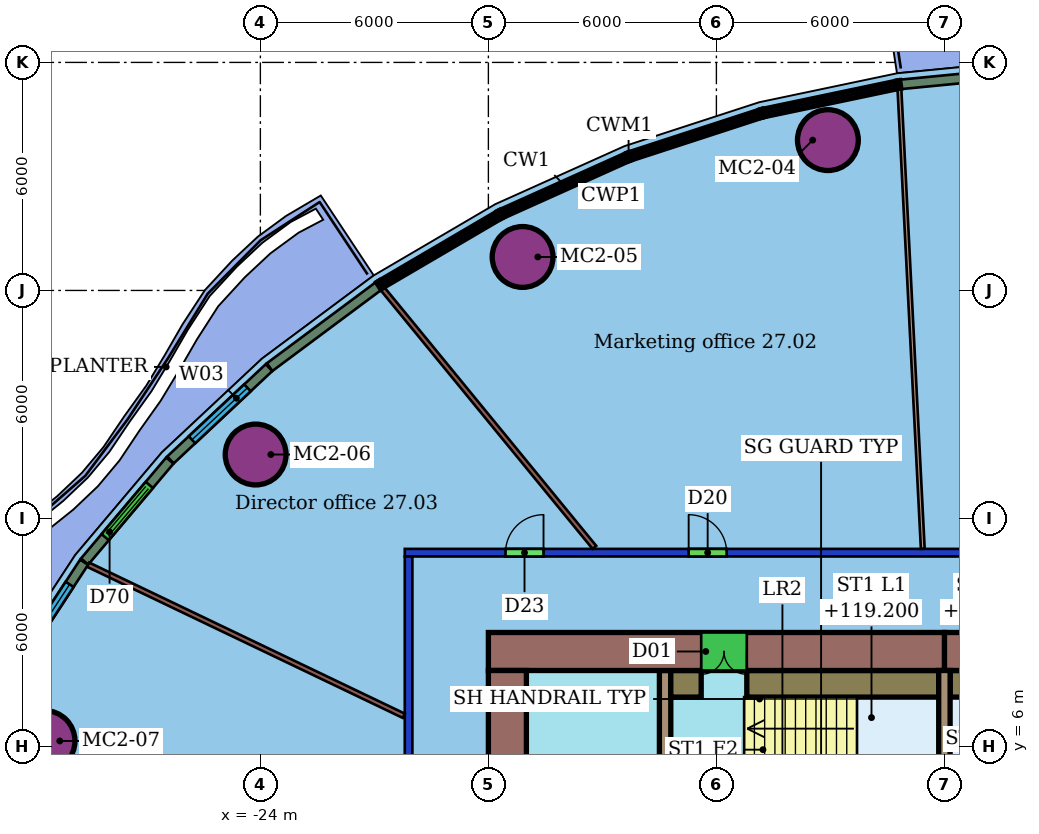
"""IFC4 building model, lengths in metres.
Left out: names, types, materials, properties, quantities, classifications, styles, units other than length and angle.
Written with IfcOpenShell. Run it as: python <this file> out.ifc"""

import sys

from ifc_helpers import new_model, si_unit, direction, frame, frame_2d, origin, origin_2d, place, context, subcontext, project, spatial, rectangle, hollow_circle, extrude, element, fill, save


model = new_model("IFC4")
c1 = context("Model", 3, precision=1e-05, world=origin(), true_north=direction((0.0, 1.0)))
c2 = subcontext(c1, "Body", "Model", "MODEL_VIEW")
j1 = project(units=[si_unit("LENGTHUNIT", "METRE"), si_unit("PLANEANGLEUNIT", "RADIAN")], contexts=[c1])
p1 = place(None, origin())
s1 = spatial("IfcSite", under=j1, at=p1, CompositionType="ELEMENT")
p2 = place(p1, origin())
s2 = spatial("IfcBuilding", under=s1, at=p2, CompositionType="ELEMENT")
p3 = place(p2, frame((0.0, 0.0, 117.4)))
s3 = spatial("IfcBuildingStorey", under=s2, at=p3, CompositionType="ELEMENT", Elevation=117.4)
for number, where, z_axis, x_axis in (
    (1, (-9.066, 21.956, 0.0), (0.0, 0.0, 1.0), (1.0, 0.0, 0.0)),
    (2, (-17.1, 18.881, 0.0), (0.0, 0.0, 1.0), (1.0, 0.0, 0.0)),
    (3, (-24.125, 13.683, 0.0), (0.0, 0.0, 1.0), (1.0, 0.0, 0.0)),
    (4, (-29.679, 6.146, 0.0), (0.0, 0.0, 1.0), (1.0, 0.0, 0.0)),
):
    element("IfcColumn", number, at=place(p3, frame(where, z_axis=z_axis, x_axis=x_axis)), inside=s3, PredefinedType="COLUMN", context=c2, shape_type="SweptSolid", body=[
        extrude(hollow_circle(Radius=0.8, WallThickness=0.055, at=origin_2d()), origin(), (0.0, 0.0, 1.0), 3.45),
    ])
p4 = place(p3, frame((-20.1, -11.0, 0.0), z_axis=(0.0, 0.0, 1.0), x_axis=(0.0, 1.0, 0.0)))
e5 = element("IfcWall", 5, at=p4, inside=s3, PredefinedType="PARTITIONING", context=c2, shape_type="SweptSolid", body=[
    extrude(rectangle(XDim=22.0, YDim=0.2, at=frame_2d((11.0, 0.0))), origin(), (0.0, 0.0, 1.0), 3.0),
])
p5 = place(p4, frame((8.824, 0.0, 0.0)))
e6 = element("IfcOpeningElement", 6, at=p5, cuts=e5, PredefinedType="OPENING", context=c2, shape_type="SweptSolid", body=[
    extrude(rectangle(XDim=1.8, YDim=2.1, at=frame_2d((0.9, 1.05))), frame((0.0, 0.11, 0.0), z_axis=(0.0, -1.0, 0.0), x_axis=(1.0, 0.0, 0.0)), (0.0, 0.0, 1.0), 0.22),
])
p6 = place(p3, frame((-20.2, 11.1, 0.0), z_axis=(0.0, 0.0, 1.0), x_axis=(1.0, 0.0, 0.0)))
e7 = element("IfcWall", 7, at=p6, inside=s3, PredefinedType="PARTITIONING", context=c2, shape_type="SweptSolid", body=[
    extrude(rectangle(XDim=28.4, YDim=0.2, at=frame_2d((14.2, 0.0))), origin(), (0.0, 0.0, 1.0), 3.0),
])
p7 = place(p6, frame((20.105, 0.0, 0.0)))
e8 = element("IfcOpeningElement", 8, at=p7, cuts=e7, PredefinedType="OPENING", context=c2, shape_type="SweptSolid", body=[
    extrude(rectangle(XDim=1.8, YDim=2.1, at=frame_2d((0.9, 1.05))), frame((0.0, 0.11, 0.0), z_axis=(0.0, -1.0, 0.0), x_axis=(1.0, 0.0, 0.0)), (0.0, 0.0, 1.0), 0.22),
])
p8 = place(p6, frame((7.47, 0.0, 0.0)))
e9 = element("IfcOpeningElement", 9, at=p8, cuts=e7, PredefinedType="OPENING", context=c2, shape_type="SweptSolid", body=[
    extrude(rectangle(XDim=1.0, YDim=2.1, at=frame_2d((0.5, 1.05))), frame((0.0, 0.11, 0.0), z_axis=(0.0, -1.0, 0.0), x_axis=(1.0, 0.0, 0.0)), (0.0, 0.0, 1.0), 0.22),
])
p9 = place(p6, frame((2.651, 0.0, 0.0)))
e10 = element("IfcOpeningElement", 10, at=p9, cuts=e7, PredefinedType="OPENING", context=c2, shape_type="SweptSolid", body=[
    extrude(rectangle(XDim=1.0, YDim=2.4, at=frame_2d((0.5, 1.2))), frame((0.0, 0.11, 0.0), z_axis=(0.0, -1.0, 0.0), x_axis=(1.0, 0.0, 0.0)), (0.0, 0.0, 1.0), 0.22),
])
p10 = place(p3, frame((-7.184, 23.293, 0.0), z_axis=(0.0, 0.0, 1.0), x_axis=(0.050758329283, -0.998710965199, 0.0)))
e11 = element("IfcWall", 11, at=p10, inside=s3, PredefinedType="PARTITIONING", context=c2, shape_type="SweptSolid", body=[
    extrude(rectangle(XDim=12.106, YDim=0.1, at=frame_2d((6.053, 0.0))), origin(), (0.0, 0.0, 1.0), 3.45),
])
p11 = place(p3, frame((-20.782, 18.041, 0.0), z_axis=(0.0, 0.0, 1.0), x_axis=(0.633801615076, -0.773495644931, 0.0)))
e12 = element("IfcWall", 12, at=p11, inside=s3, PredefinedType="PARTITIONING", context=c2, shape_type="SweptSolid", body=[
    extrude(rectangle(XDim=8.792, YDim=0.125, at=frame_2d((4.396, 0.0))), origin(), (0.0, 0.0, 1.0), 3.45),
])
p12 = place(p3, frame((-28.532, 10.784, 0.0), z_axis=(0.0, 0.0, 1.0), x_axis=(0.902015716064, -0.431703194306, 0.0)))
e13 = element("IfcWall", 13, at=p12, inside=s3, PredefinedType="PARTITIONING", context=c2, shape_type="SweptSolid", body=[
    extrude(rectangle(XDim=9.207, YDim=0.125, at=frame_2d((4.604, 0.0))), origin(), (0.0, 0.0, 1.0), 3.45),
])
for number, where, z_axis, x_axis in (
    (14, (-3.598, 23.769, 0.0), (0.0, 0.0, 1.0), (-0.995, -0.097, 0.0)),
    (15, (-20.896, 18.112, 0.0), (0.0, 0.0, 1.0), (-0.802, -0.597, 0.0)),
):
    element("IfcWall", number, at=place(p3, frame(where, z_axis=z_axis, x_axis=x_axis)), inside=s3, PredefinedType="SOLIDWALL", context=c2, shape_type="SweptSolid", body=[
        extrude(rectangle(XDim=3.567, YDim=0.25, at=frame_2d((1.783, 0.0))), origin(), (0.0, 0.0, 1.0), 3.05),
    ])
p13 = place(p3, frame((-23.774, 15.968, 0.0), z_axis=(0.0, 0.0, 1.0), x_axis=(-0.729895135737, -0.683559134843, 0.0)))
e16 = element("IfcWall", 16, at=p13, inside=s3, PredefinedType="SOLIDWALL", context=c2, shape_type="SweptSolid", body=[
    extrude(rectangle(XDim=3.551, YDim=0.25, at=frame_2d((1.776, 0.0))), origin(), (0.0, 0.0, 1.0), 3.05),
])
p14 = place(p13, frame((0.776, 0.0, 0.9)))
e17 = element("IfcOpeningElement", 17, at=p14, cuts=e16, PredefinedType="OPENING", context=c2, shape_type="SweptSolid", body=[
    extrude(rectangle(XDim=2.0, YDim=2.1, at=frame_2d((1.0, 1.05))), frame((0.0, 0.135, 0.0), z_axis=(0.0, -1.0, 0.0), x_axis=(1.0, 0.0, 0.0)), (0.0, 0.0, 1.0), 0.27),
])
p15 = place(p3, frame((-26.381, 13.524, 0.0), z_axis=(0.0, 0.0, 1.0), x_axis=(-0.645164421971, -0.764043760934, 0.0)))
e18 = element("IfcWall", 18, at=p15, inside=s3, PredefinedType="SOLIDWALL", context=c2, shape_type="SweptSolid", body=[
    extrude(rectangle(XDim=3.477, YDim=0.25, at=frame_2d((1.738, 0.0))), origin(), (0.0, 0.0, 1.0), 3.05),
])
p16 = place(p15, frame((0.839, 0.0, 0.0)))
e19 = element("IfcOpeningElement", 19, at=p16, cuts=e18, PredefinedType="OPENING", context=c2, shape_type="SweptSolid", body=[
    extrude(rectangle(XDim=1.8, YDim=2.4, at=frame_2d((0.9, 1.2))), frame((0.0, 0.135, 0.0), z_axis=(0.0, -1.0, 0.0), x_axis=(1.0, 0.0, 0.0)), (0.0, 0.0, 1.0), 0.27),
])
p17 = place(p3, frame((-28.638, 10.849, 0.0), z_axis=(0.0, 0.0, 1.0), x_axis=(-0.547270693195, -0.836955666908, 0.0)))
e20 = element("IfcWall", 20, at=p17, inside=s3, PredefinedType="SOLIDWALL", context=c2, shape_type="SweptSolid", body=[
    extrude(rectangle(XDim=3.392, YDim=0.25, at=frame_2d((1.696, 0.0))), origin(), (0.0, 0.0, 1.0), 3.05),
])
p18 = place(p17, frame((0.696, 0.0, 0.9)))
e21 = element("IfcOpeningElement", 21, at=p18, cuts=e20, PredefinedType="OPENING", context=c2, shape_type="SweptSolid", body=[
    extrude(rectangle(XDim=2.0, YDim=2.1, at=frame_2d((1.0, 1.05))), frame((0.0, 0.135, 0.0), z_axis=(0.0, -1.0, 0.0), x_axis=(1.0, 0.0, 0.0)), (0.0, 0.0, 1.0), 0.27),
])
p19 = place(p3, frame((6.0, 8.5, 0.0), z_axis=(0.0, 0.0, 1.0), x_axis=(-1.0, 0.0, 0.0)))
e22 = element("IfcWall", 22, at=p19, inside=s3, PredefinedType="SHEAR", context=c2, shape_type="SweptSolid", body=[
    extrude(rectangle(XDim=12.0, YDim=1.0, at=frame_2d((6.0, 0.0))), origin(), (0.0, 0.0, 1.0), 3.3),
])
p20 = place(p19, frame((5.6, 0.0, 0.0)))
e23 = element("IfcOpeningElement", 23, at=p20, cuts=e22, PredefinedType="OPENING", context=c2, shape_type="SweptSolid", body=[
    extrude(rectangle(XDim=1.2, YDim=2.1, at=frame_2d((0.6, 1.05))), frame((0.0, 0.51, 0.0), z_axis=(0.0, -1.0, 0.0), x_axis=(1.0, 0.0, 0.0)), (0.0, 0.0, 1.0), 1.02),
])
p21 = place(p3, frame((-6.0, 8.5, 0.0), z_axis=(0.0, 0.0, 1.0), x_axis=(-1.0, 0.0, 0.0)))
e24 = element("IfcWall", 24, at=p21, inside=s3, PredefinedType="SHEAR", context=c2, shape_type="SweptSolid", body=[
    extrude(rectangle(XDim=12.0, YDim=1.0, at=frame_2d((6.0, 0.0))), origin(), (0.0, 0.0, 1.0), 3.3),
])
p22 = place(p21, frame((5.2, 0.0, 0.0)))
e25 = element("IfcOpeningElement", 25, at=p22, cuts=e24, PredefinedType="OPENING", context=c2, shape_type="SweptSolid", body=[
    extrude(rectangle(XDim=1.2, YDim=2.1, at=frame_2d((0.6, 1.05))), frame((0.0, 0.51, 0.0), z_axis=(0.0, -1.0, 0.0), x_axis=(1.0, 0.0, 0.0)), (0.0, 0.0, 1.0), 1.02),
])
p23 = place(p3, frame((-17.5, 8.0, 0.0), z_axis=(0.0, 0.0, 1.0), x_axis=(0.0, -1.0, 0.0)))
e26 = element("IfcWall", 26, at=p23, inside=s3, PredefinedType="SHEAR", context=c2, shape_type="SweptSolid", body=[
    extrude(rectangle(XDim=16.0, YDim=1.0, at=frame_2d((8.0, 0.0))), origin(), (0.0, 0.0, 1.0), 3.3),
])
p24 = place(p23, frame((11.9, 0.0, 0.0)))
e27 = element("IfcOpeningElement", 27, at=p24, cuts=e26, PredefinedType="OPENING", context=c2, shape_type="SweptSolid", body=[
    extrude(rectangle(XDim=1.2, YDim=2.1, at=frame_2d((0.6, 1.05))), frame((0.0, 0.51, 0.0), z_axis=(0.0, -1.0, 0.0), x_axis=(1.0, 0.0, 0.0)), (0.0, 0.0, 1.0), 1.02),
])
p25 = place(p23, frame((2.9, 0.0, 0.0)))
e28 = element("IfcOpeningElement", 28, at=p25, cuts=e26, PredefinedType="OPENING", context=c2, shape_type="SweptSolid", body=[
    extrude(rectangle(XDim=1.2, YDim=2.1, at=frame_2d((0.6, 1.05))), frame((0.0, 0.51, 0.0), z_axis=(0.0, -1.0, 0.0), x_axis=(1.0, 0.0, 0.0)), (0.0, 0.0, 1.0), 1.02),
])
p26 = place(p3, frame((-13.35, 8.0, 0.0), z_axis=(0.0, 0.0, 1.0), x_axis=(0.0, -1.0, 0.0)))
e29 = element("IfcWall", 29, at=p26, inside=s3, PredefinedType="SHEAR", context=c2, shape_type="SweptSolid", body=[
    extrude(rectangle(XDim=16.0, YDim=0.3, at=frame_2d((8.0, 0.0))), origin(), (0.0, 0.0, 1.0), 3.3),
])
p27 = place(p26, frame((7.25, 0.0, 0.0)))
e30 = element("IfcOpeningElement", 30, at=p27, cuts=e29, PredefinedType="OPENING", context=c2, shape_type="SweptSolid", body=[
    extrude(rectangle(XDim=1.5, YDim=2.1, at=frame_2d((0.75, 1.05))), frame((0.0, 0.16, 0.0), z_axis=(0.0, -1.0, 0.0), x_axis=(1.0, 0.0, 0.0)), (0.0, 0.0, 1.0), 0.32),
])
p28 = place(p3, frame((-6.0, 3.88, 0.0), z_axis=(0.0, 0.0, 1.0), x_axis=(0.0, 1.0, 0.0)))
e31 = element("IfcWall", 31, at=p28, inside=s3, PredefinedType="SHEAR", context=c2, shape_type="SweptSolid", body=[
    extrude(rectangle(XDim=4.12, YDim=0.3, at=frame_2d((2.06, 0.0))), origin(), (0.0, 0.0, 1.0), 3.3),
])
p29 = place(p3, frame((-13.2, 7.65, 0.0), z_axis=(0.0, 0.0, 1.0), x_axis=(1.0, 0.0, 0.0)))
e32 = element("IfcWall", 32, at=p29, inside=s3, PredefinedType="SHEAR", context=c2, shape_type="SweptSolid", body=[
    extrude(rectangle(XDim=0.8, YDim=0.7, at=frame_2d((0.4, 0.0))), origin(), (0.0, 0.0, 1.0), 3.3),
])
for number, where, z_axis, x_axis in (
    (33, (-11.2, 7.65, 0.0), (0.0, 0.0, 1.0), (1.0, 0.0, 0.0)),
    (34, (-5.85, 7.65, 0.0), (0.0, 0.0, 1.0), (1.0, 0.0, 0.0)),
):
    element("IfcWall", number, at=place(p3, frame(where, z_axis=z_axis, x_axis=x_axis)), inside=s3, PredefinedType="SHEAR", context=c2, shape_type="SweptSolid", body=[
        extrude(rectangle(XDim=5.05, YDim=0.7, at=frame_2d((2.525, 0.0))), origin(), (0.0, 0.0, 1.0), 3.3),
    ])
p30 = place(p8, origin())
e35 = element("IfcDoor", 35, at=p30, inside=s3, OperationType="SINGLE_SWING_LEFT", PredefinedType="DOOR", context=c2, shape_type="SweptSolid", body=[
    extrude(rectangle(XDim=1.0, YDim=2.1, at=frame_2d((0.5, 1.05))), frame((0.0, 0.025, 0.0), z_axis=(0.0, -1.0, 0.0), x_axis=(1.0, 0.0, 0.0)), (0.0, 0.0, 1.0), 0.05),
])
fill(e9, e35)
p31 = place(p9, origin())
e36 = element("IfcDoor", 36, at=p31, inside=s3, OperationType="SINGLE_SWING_RIGHT", PredefinedType="DOOR", context=c2, shape_type="SweptSolid", body=[
    extrude(rectangle(XDim=1.0, YDim=2.4, at=frame_2d((0.5, 1.2))), frame((0.0, 0.025, 0.0), z_axis=(0.0, -1.0, 0.0), x_axis=(1.0, 0.0, 0.0)), (0.0, 0.0, 1.0), 0.05),
])
fill(e10, e36)
p32 = place(p14, origin())
e37 = element("IfcWindow", 37, at=p32, inside=s3, PartitioningType="SINGLE_PANEL", PredefinedType="WINDOW", context=c2, shape_type="SweptSolid", body=[
    extrude(rectangle(XDim=2.0, YDim=2.1, at=frame_2d((1.0, 1.05))), frame((0.0, 0.03, 0.0), z_axis=(0.0, -1.0, 0.0), x_axis=(1.0, 0.0, 0.0)), (0.0, 0.0, 1.0), 0.06),
])
fill(e17, e37)
p33 = place(p16, origin())
e38 = element("IfcDoor", 38, at=p33, inside=s3, OperationType="DOUBLE_DOOR_SLIDING", PredefinedType="DOOR", context=c2, shape_type="SweptSolid", body=[
    extrude(rectangle(XDim=1.8, YDim=2.4, at=frame_2d((0.9, 1.2))), frame((0.0, 0.025, 0.0), z_axis=(0.0, -1.0, 0.0), x_axis=(1.0, 0.0, 0.0)), (0.0, 0.0, 1.0), 0.05),
])
fill(e19, e38)
p34 = place(p18, origin())
e39 = element("IfcWindow", 39, at=p34, inside=s3, PartitioningType="SINGLE_PANEL", PredefinedType="WINDOW", context=c2, shape_type="SweptSolid", body=[
    extrude(rectangle(XDim=2.0, YDim=2.1, at=frame_2d((1.0, 1.05))), frame((0.0, 0.03, 0.0), z_axis=(0.0, -1.0, 0.0), x_axis=(1.0, 0.0, 0.0)), (0.0, 0.0, 1.0), 0.06),
])
fill(e21, e39)
p35 = place(p22, origin())
e40 = element("IfcDoor", 40, at=p35, inside=s3, OperationType="DOUBLE_DOOR_SINGLE_SWING", PredefinedType="NOTDEFINED", context=c2, shape_type="SweptSolid", body=[
    extrude(rectangle(XDim=1.2, YDim=2.1, at=frame_2d((0.6, 1.05))), frame((0.0, 0.025, 0.0), z_axis=(0.0, -1.0, 0.0), x_axis=(1.0, 0.0, 0.0)), (0.0, 0.0, 1.0), 0.05),
])
fill(e25, e40)
save(model, sys.argv[1])
